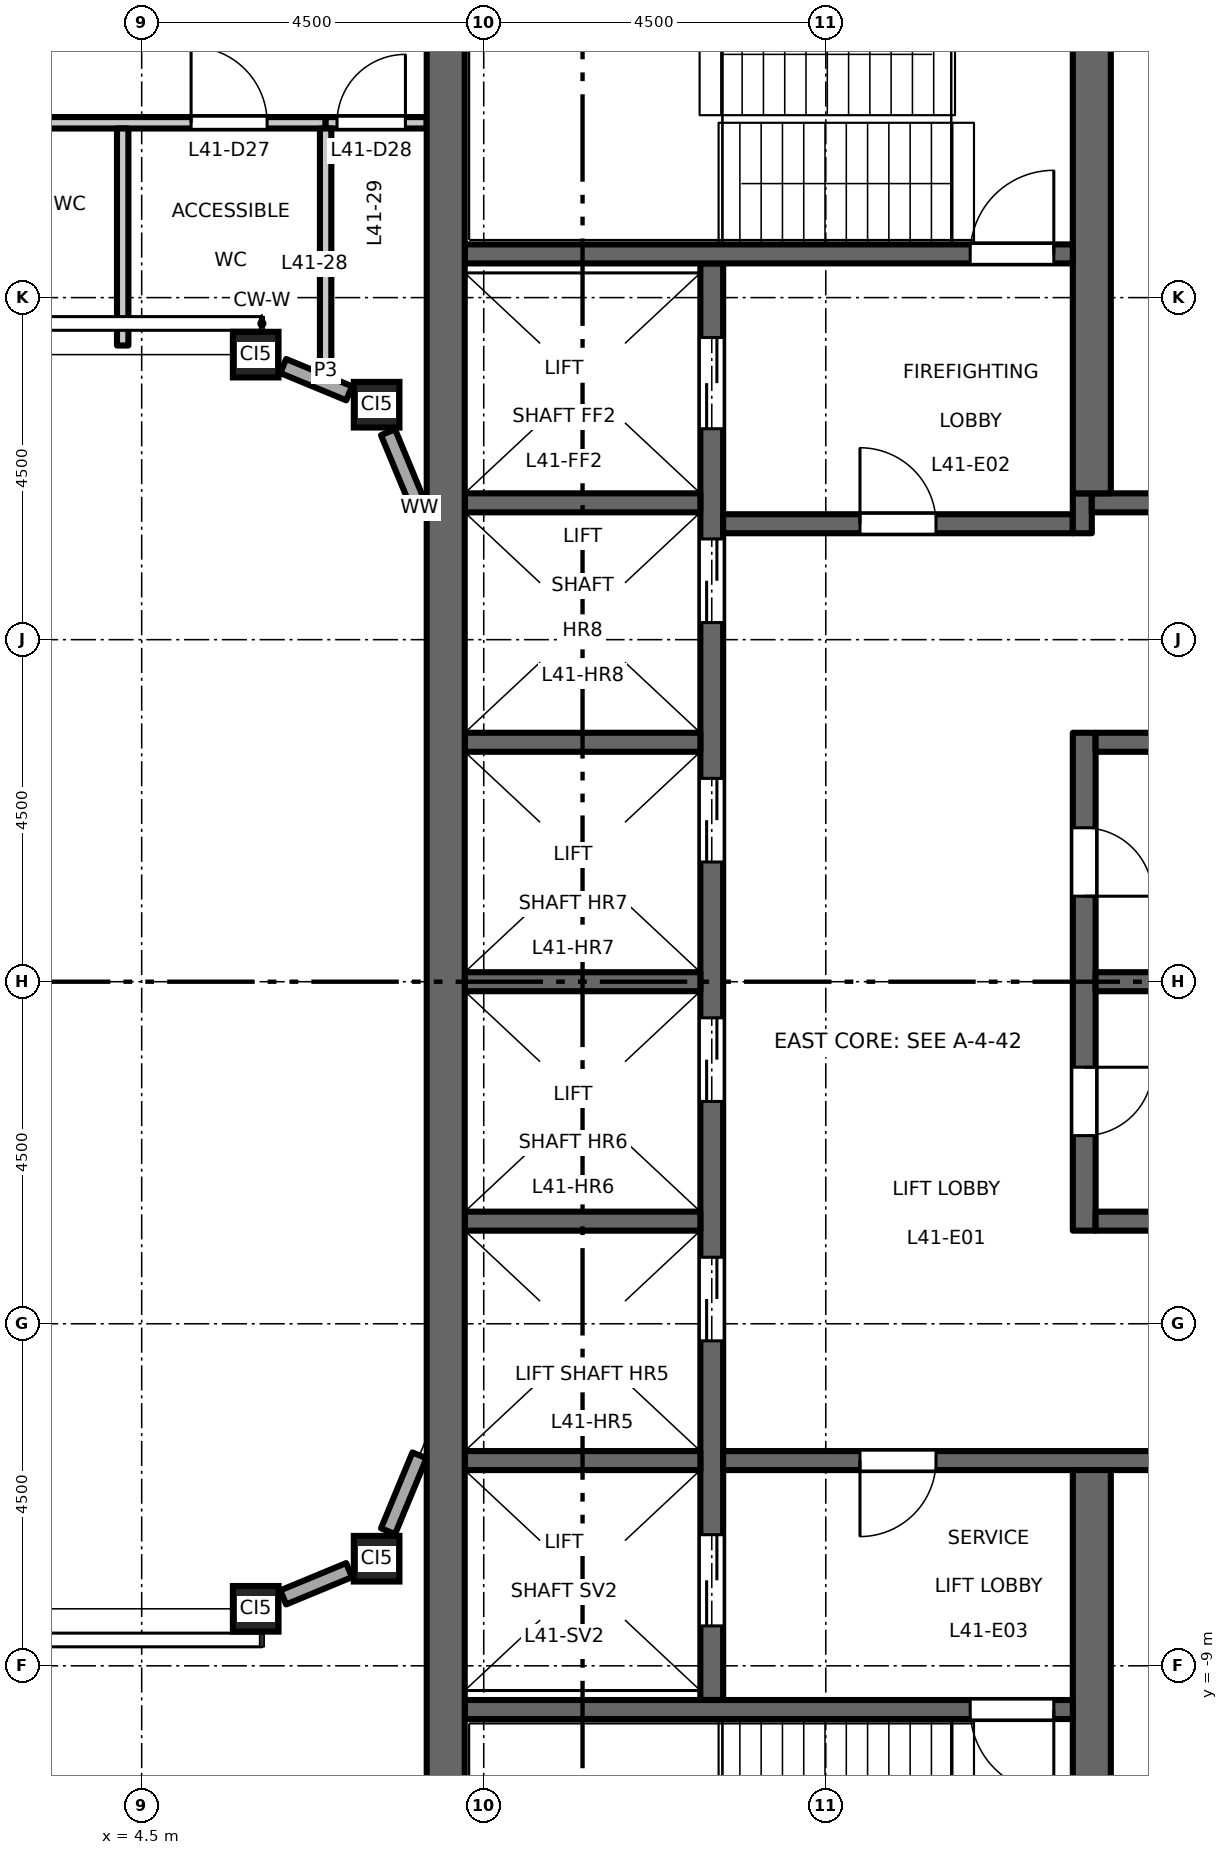
"""IFC4 building model, lengths in metres.
Left out: names, types, materials, properties, quantities, classifications, styles, units other than length and angle.
Written with IfcOpenShell. Run it as: python <this file> out.ifc"""

import sys

from ifc_helpers import new_model, si_unit, direction, frame, frame_2d, origin, origin_2d, place, context, subcontext, project, spatial, rectangle, hollow_rectangle, extrude, element, fill, save


model = new_model("IFC4")
c1 = context("Model", 3, precision=1e-05, world=origin(), true_north=direction((0.0, 1.0)))
c2 = subcontext(c1, "Body", "Model", "MODEL_VIEW")
j1 = project(units=[si_unit("LENGTHUNIT", "METRE"), si_unit("PLANEANGLEUNIT", "RADIAN")], contexts=[c1])
p1 = place(None, origin())
s1 = spatial("IfcSite", under=j1, at=p1, CompositionType="ELEMENT")
p2 = place(p1, origin())
s2 = spatial("IfcBuilding", under=s1, at=p2, CompositionType="ELEMENT")
p3 = place(p2, frame((0.0, 0.0, 192.7)))
s3 = spatial("IfcBuildingStorey", under=s2, at=p3, CompositionType="ELEMENT", Elevation=192.7)
for number, where, z_axis, x_axis in (
    (1, (6.0, -8.25, 0.0), (0.0, 0.0, 1.0), (1.0, 0.0, 0.0)),
    (2, (7.591, -7.591, 0.0), (0.0, 0.0, 1.0), (1.0, 0.0, 0.0)),
    (3, (6.0, 8.25, 0.0), (0.0, 0.0, 1.0), (1.0, 0.0, 0.0)),
    (4, (7.591, 7.591, 0.0), (0.0, 0.0, 1.0), (1.0, 0.0, 0.0)),
):
    element("IfcColumn", number, at=place(p3, frame(where, z_axis=z_axis, x_axis=x_axis)), inside=s3, PredefinedType="COLUMN", context=c2, shape_type="SweptSolid", body=[
        extrude(hollow_rectangle(XDim=0.6, YDim=0.6, WallThickness=0.032, at=origin_2d()), origin(), (0.0, 0.0, 1.0), 4.5),
    ])
p4 = place(p3, frame((12.0, -9.45, 0.0), z_axis=(0.0, 0.0, 1.0), x_axis=(0.0, 1.0, 0.0)))
e5 = element("IfcWall", 5, at=p4, inside=s3, PredefinedType="SHEAR", context=c2, shape_type="SweptSolid", body=[
    extrude(rectangle(XDim=18.9, YDim=0.3, at=frame_2d((9.45, 0.0))), origin(), (0.0, 0.0, 1.0), 4.35),
])
p5 = place(p4, frame((4.725, 0.0, 0.0)))
e6 = element("IfcOpeningElement", 6, at=p5, cuts=e5, PredefinedType="OPENING", context=c2, shape_type="SweptSolid", body=[
    extrude(rectangle(XDim=1.1, YDim=2.1, at=frame_2d((0.55, 1.05))), frame((0.0, 0.16, 0.0), z_axis=(0.0, -1.0, 0.0), x_axis=(1.0, 0.0, 0.0)), (0.0, 0.0, 1.0), 0.32),
])
p6 = place(p4, frame((7.875, 0.0, 0.0)))
e7 = element("IfcOpeningElement", 7, at=p6, cuts=e5, PredefinedType="OPENING", context=c2, shape_type="SweptSolid", body=[
    extrude(rectangle(XDim=1.1, YDim=2.1, at=frame_2d((0.55, 1.05))), frame((0.0, 0.16, 0.0), z_axis=(0.0, -1.0, 0.0), x_axis=(1.0, 0.0, 0.0)), (0.0, 0.0, 1.0), 0.32),
])
p7 = place(p4, frame((11.025, 0.0, 0.0)))
e8 = element("IfcOpeningElement", 8, at=p7, cuts=e5, PredefinedType="OPENING", context=c2, shape_type="SweptSolid", body=[
    extrude(rectangle(XDim=1.1, YDim=2.1, at=frame_2d((0.55, 1.05))), frame((0.0, 0.16, 0.0), z_axis=(0.0, -1.0, 0.0), x_axis=(1.0, 0.0, 0.0)), (0.0, 0.0, 1.0), 0.32),
])
p8 = place(p4, frame((14.175, 0.0, 0.0)))
e9 = element("IfcOpeningElement", 9, at=p8, cuts=e5, PredefinedType="OPENING", context=c2, shape_type="SweptSolid", body=[
    extrude(rectangle(XDim=1.1, YDim=2.1, at=frame_2d((0.55, 1.05))), frame((0.0, 0.16, 0.0), z_axis=(0.0, -1.0, 0.0), x_axis=(1.0, 0.0, 0.0)), (0.0, 0.0, 1.0), 0.32),
])
p9 = place(p4, frame((16.725, 0.0, 0.0)))
e10 = element("IfcOpeningElement", 10, at=p9, cuts=e5, PredefinedType="OPENING", context=c2, shape_type="SweptSolid", body=[
    extrude(rectangle(XDim=1.2, YDim=2.1, at=frame_2d((0.6, 1.05))), frame((0.0, 0.16, 0.0), z_axis=(0.0, -1.0, 0.0), x_axis=(1.0, 0.0, 0.0)), (0.0, 0.0, 1.0), 0.32),
])
p10 = place(p4, frame((0.975, 0.0, 0.0)))
e11 = element("IfcOpeningElement", 11, at=p10, cuts=e5, PredefinedType="OPENING", context=c2, shape_type="SweptSolid", body=[
    extrude(rectangle(XDim=1.2, YDim=2.1, at=frame_2d((0.6, 1.05))), frame((0.0, 0.16, 0.0), z_axis=(0.0, -1.0, 0.0), x_axis=(1.0, 0.0, 0.0)), (0.0, 0.0, 1.0), 0.32),
])
p11 = place(p3, frame((12.15, 6.025, 0.0), z_axis=(0.0, 0.0, 1.0), x_axis=(1.0, 0.0, 0.0)))
e12 = element("IfcWall", 12, at=p11, inside=s3, PredefinedType="SHEAR", context=c2, shape_type="SweptSolid", body=[
    extrude(rectangle(XDim=4.6, YDim=0.25, at=frame_2d((2.3, 0.0))), origin(), (0.0, 0.0, 1.0), 4.35),
])
p12 = place(p11, frame((1.8, 0.0, 0.0)))
e13 = element("IfcOpeningElement", 13, at=p12, cuts=e12, PredefinedType="OPENING", context=c2, shape_type="SweptSolid", body=[
    extrude(rectangle(XDim=1.0, YDim=2.1, at=frame_2d((0.5, 1.05))), frame((0.0, 0.135, 0.0), z_axis=(0.0, -1.0, 0.0), x_axis=(1.0, 0.0, 0.0)), (0.0, 0.0, 1.0), 0.27),
])
p13 = place(p3, frame((16.875, 5.9, 0.0), z_axis=(0.0, 0.0, 1.0), x_axis=(0.0, 1.0, 0.0)))
e14 = element("IfcWall", 14, at=p13, inside=s3, PredefinedType="SHEAR", context=c2, shape_type="SweptSolid", body=[
    extrude(rectangle(XDim=0.525, YDim=0.25, at=frame_2d((0.263, 0.0))), origin(), (0.0, 0.0, 1.0), 4.35),
])
p14 = place(p3, frame((17.0, 6.3, 0.0), z_axis=(0.0, 0.0, 1.0), x_axis=(1.0, 0.0, 0.0)))
e15 = element("IfcWall", 15, at=p14, inside=s3, PredefinedType="SHEAR", context=c2, shape_type="SweptSolid", body=[
    extrude(rectangle(XDim=4.25, YDim=0.25, at=frame_2d((2.125, 0.0))), origin(), (0.0, 0.0, 1.0), 4.35),
])
p15 = place(p3, frame((12.15, -6.3, 0.0), z_axis=(0.0, 0.0, 1.0), x_axis=(1.0, 0.0, 0.0)))
e16 = element("IfcWall", 16, at=p15, inside=s3, PredefinedType="SHEAR", context=c2, shape_type="SweptSolid", body=[
    extrude(rectangle(XDim=9.1, YDim=0.25, at=frame_2d((4.55, 0.0))), origin(), (0.0, 0.0, 1.0), 4.35),
])
p16 = place(p15, frame((1.8, 0.0, 0.0)))
e17 = element("IfcOpeningElement", 17, at=p16, cuts=e16, PredefinedType="OPENING", context=c2, shape_type="SweptSolid", body=[
    extrude(rectangle(XDim=1.0, YDim=2.1, at=frame_2d((0.5, 1.05))), frame((0.0, 0.135, 0.0), z_axis=(0.0, -1.0, 0.0), x_axis=(1.0, 0.0, 0.0)), (0.0, 0.0, 1.0), 0.27),
])
p17 = place(p3, frame((16.9, -3.275, 0.0), z_axis=(0.0, 0.0, 1.0), x_axis=(0.0, 1.0, 0.0)))
e18 = element("IfcWall", 18, at=p17, inside=s3, PredefinedType="SHEAR", context=c2, shape_type="SweptSolid", body=[
    extrude(rectangle(XDim=6.55, YDim=0.3, at=frame_2d((3.275, 0.0))), origin(), (0.0, 0.0, 1.0), 4.35),
])
p18 = place(p17, frame((1.25, 0.0, 0.0)))
e19 = element("IfcOpeningElement", 19, at=p18, cuts=e18, PredefinedType="OPENING", context=c2, shape_type="SweptSolid", body=[
    extrude(rectangle(XDim=0.9, YDim=2.1, at=frame_2d((0.45, 1.05))), frame((0.0, 0.16, 0.0), z_axis=(0.0, -1.0, 0.0), x_axis=(1.0, 0.0, 0.0)), (0.0, 0.0, 1.0), 0.32),
])
p19 = place(p17, frame((4.4, 0.0, 0.0)))
e20 = element("IfcOpeningElement", 20, at=p19, cuts=e18, PredefinedType="OPENING", context=c2, shape_type="SweptSolid", body=[
    extrude(rectangle(XDim=0.9, YDim=2.1, at=frame_2d((0.45, 1.05))), frame((0.0, 0.16, 0.0), z_axis=(0.0, -1.0, 0.0), x_axis=(1.0, 0.0, 0.0)), (0.0, 0.0, 1.0), 0.32),
])
for number, where, z_axis, x_axis in (
    (21, (17.05, 0.0, 0.0), (0.0, 0.0, 1.0), (1.0, 0.0, 0.0)),
    (22, (17.05, 3.15, 0.0), (0.0, 0.0, 1.0), (1.0, 0.0, 0.0)),
    (23, (17.05, -3.15, 0.0), (0.0, 0.0, 1.0), (1.0, 0.0, 0.0)),
):
    element("IfcWall", number, at=place(p3, frame(where, z_axis=z_axis, x_axis=x_axis)), inside=s3, PredefinedType="SHEAR", context=c2, shape_type="SweptSolid", body=[
        extrude(rectangle(XDim=4.2, YDim=0.25, at=frame_2d((2.1, 0.0))), origin(), (0.0, 0.0, 1.0), 4.35),
    ])
for number, where, z_axis, x_axis in (
    (24, (17.0, 6.425, 0.0), (0.0, 0.0, 1.0), (0.0, 1.0, 0.0)),
    (25, (17.0, -13.0, 0.0), (0.0, 0.0, 1.0), (0.0, 1.0, 0.0)),
):
    element("IfcWall", number, at=place(p3, frame(where, z_axis=z_axis, x_axis=x_axis)), inside=s3, PredefinedType="SHEAR", context=c2, shape_type="SweptSolid", body=[
        extrude(rectangle(XDim=6.575, YDim=0.5, at=frame_2d((3.288, 0.0))), origin(), (0.0, 0.0, 1.0), 4.35),
    ])
for number, where, z_axis, x_axis in (
    (26, (8.75, 0.0, 0.0), (0.0, 0.0, 1.0), (1.0, 0.0, 0.0)),
    (27, (8.75, 3.15, 0.0), (0.0, 0.0, 1.0), (1.0, 0.0, 0.0)),
    (28, (8.75, 6.3, 0.0), (0.0, 0.0, 1.0), (1.0, 0.0, 0.0)),
    (29, (8.75, -3.15, 0.0), (0.0, 0.0, 1.0), (1.0, 0.0, 0.0)),
    (30, (8.75, -6.3, 0.0), (0.0, 0.0, 1.0), (1.0, 0.0, 0.0)),
):
    element("IfcWall", number, at=place(p3, frame(where, z_axis=z_axis, x_axis=x_axis)), inside=s3, PredefinedType="SHEAR", context=c2, shape_type="SweptSolid", body=[
        extrude(rectangle(XDim=3.1, YDim=0.25, at=frame_2d((1.55, 0.0))), origin(), (0.0, 0.0, 1.0), 4.35),
    ])
p20 = place(p3, frame((8.75, 9.575, 0.0), z_axis=(0.0, 0.0, 1.0), x_axis=(1.0, 0.0, 0.0)))
e31 = element("IfcWall", 31, at=p20, inside=s3, PredefinedType="SHEAR", context=c2, shape_type="SweptSolid", body=[
    extrude(rectangle(XDim=8.0, YDim=0.25, at=frame_2d((4.0, 0.0))), origin(), (0.0, 0.0, 1.0), 4.35),
])
p21 = place(p20, frame((6.65, 0.0, 0.0)))
e32 = element("IfcOpeningElement", 32, at=p21, cuts=e31, PredefinedType="OPENING", context=c2, shape_type="SweptSolid", body=[
    extrude(rectangle(XDim=1.1, YDim=2.1, at=frame_2d((0.55, 1.05))), frame((0.0, 0.135, 0.0), z_axis=(0.0, -1.0, 0.0), x_axis=(1.0, 0.0, 0.0)), (0.0, 0.0, 1.0), 0.27),
])
p22 = place(p3, frame((8.75, -9.575, 0.0), z_axis=(0.0, 0.0, 1.0), x_axis=(1.0, 0.0, 0.0)))
e33 = element("IfcWall", 33, at=p22, inside=s3, PredefinedType="SHEAR", context=c2, shape_type="SweptSolid", body=[
    extrude(rectangle(XDim=8.0, YDim=0.25, at=frame_2d((4.0, 0.0))), origin(), (0.0, 0.0, 1.0), 4.35),
])
p23 = place(p22, frame((6.65, 0.0, 0.0)))
e34 = element("IfcOpeningElement", 34, at=p23, cuts=e33, PredefinedType="OPENING", context=c2, shape_type="SweptSolid", body=[
    extrude(rectangle(XDim=1.1, YDim=2.1, at=frame_2d((0.55, 1.05))), frame((0.0, 0.135, 0.0), z_axis=(0.0, -1.0, 0.0), x_axis=(1.0, 0.0, 0.0)), (0.0, 0.0, 1.0), 0.27),
])
p24 = place(p3, frame((8.5, -13.0, 0.0), z_axis=(0.0, 0.0, 1.0), x_axis=(0.0, 1.0, 0.0)))
e35 = element("IfcWall", 35, at=p24, inside=s3, PredefinedType="SHEAR", context=c2, shape_type="SweptSolid", body=[
    extrude(rectangle(XDim=26.0, YDim=0.5, at=frame_2d((13.0, 0.0))), origin(), (0.0, 0.0, 1.0), 4.35),
])
p25 = place(p3, frame((6.362, -8.1, 0.0), z_axis=(0.0, 0.0, 1.0), x_axis=(0.923829670615, 0.382803787458, 0.0)))
e36 = element("IfcWall", 36, at=p25, inside=s3, PredefinedType="STANDARD", context=c2, shape_type="SweptSolid", body=[
    extrude(rectangle(XDim=0.938, YDim=0.2, at=frame_2d((0.469, 0.0))), origin(), (0.0, 0.0, 1.0), 3.918),
])
for number, where, z_axis, x_axis in (
    (37, (7.741, -7.229, 0.0), (0.0, 0.0, 1.0), (0.383, 0.924, 0.0)),
    (38, (8.154, 6.231, 0.0), (0.0, 0.0, 1.0), (-0.383, 0.924, 0.0)),
):
    element("IfcWall", number, at=place(p3, frame(where, z_axis=z_axis, x_axis=x_axis)), inside=s3, PredefinedType="STANDARD", context=c2, shape_type="SweptSolid", body=[
        extrude(rectangle(XDim=1.08, YDim=0.2, at=frame_2d((0.54, 0.0))), origin(), (0.0, 0.0, 1.0), 3.918),
    ])
p26 = place(p3, frame((7.229, 7.741, 0.0), z_axis=(0.0, 0.0, 1.0), x_axis=(-0.923829670615, 0.382803787458, 0.0)))
e39 = element("IfcWall", 39, at=p26, inside=s3, PredefinedType="STANDARD", context=c2, shape_type="SweptSolid", body=[
    extrude(rectangle(XDim=0.938, YDim=0.2, at=frame_2d((0.469, 0.0))), origin(), (0.0, 0.0, 1.0), 3.918),
])
p27 = place(p3, frame((-8.25, 11.3, 0.0), z_axis=(0.0, 0.0, 1.0), x_axis=(1.0, 0.0, 0.0)))
e40 = element("IfcWall", 40, at=p27, inside=s3, PredefinedType="PARTITIONING", context=c2, shape_type="SweptSolid", body=[
    extrude(rectangle(XDim=15.17, YDim=0.15, at=frame_2d((7.585, 0.0))), origin(), (0.0, 0.0, 1.0), 4.35),
])
p28 = place(p27, frame((2.65, 0.0, 0.0)))
e41 = element("IfcOpeningElement", 41, at=p28, cuts=e40, PredefinedType="OPENING", context=c2, shape_type="SweptSolid", body=[
    extrude(rectangle(XDim=1.0, YDim=2.1, at=frame_2d((0.5, 1.05))), frame((0.0, 0.085, 0.0), z_axis=(0.0, -1.0, 0.0), x_axis=(1.0, 0.0, 0.0)), (0.0, 0.0, 1.0), 0.17),
])
p29 = place(p27, frame((8.9, 0.0, 0.0)))
e42 = element("IfcOpeningElement", 42, at=p29, cuts=e40, PredefinedType="OPENING", context=c2, shape_type="SweptSolid", body=[
    extrude(rectangle(XDim=1.0, YDim=2.1, at=frame_2d((0.5, 1.05))), frame((0.0, 0.085, 0.0), z_axis=(0.0, -1.0, 0.0), x_axis=(1.0, 0.0, 0.0)), (0.0, 0.0, 1.0), 0.17),
])
p30 = place(p27, frame((13.4, 0.0, 0.0)))
e43 = element("IfcOpeningElement", 43, at=p30, cuts=e40, PredefinedType="OPENING", context=c2, shape_type="SweptSolid", body=[
    extrude(rectangle(XDim=1.0, YDim=2.1, at=frame_2d((0.5, 1.05))), frame((0.0, 0.085, 0.0), z_axis=(0.0, -1.0, 0.0), x_axis=(1.0, 0.0, 0.0)), (0.0, 0.0, 1.0), 0.17),
])
p31 = place(p3, frame((6.92, 11.3, 0.0), z_axis=(0.0, 0.0, 1.0), x_axis=(1.0, 0.0, 0.0)))
e44 = element("IfcWall", 44, at=p31, inside=s3, PredefinedType="PARTITIONING", context=c2, shape_type="SweptSolid", body=[
    extrude(rectangle(XDim=1.33, YDim=0.15, at=frame_2d((0.665, 0.0))), origin(), (0.0, 0.0, 1.0), 4.35),
])
p32 = place(p31, frame((0.15, 0.0, 0.0)))
e45 = element("IfcOpeningElement", 45, at=p32, cuts=e44, PredefinedType="OPENING", context=c2, shape_type="SweptSolid", body=[
    extrude(rectangle(XDim=0.9, YDim=2.1, at=frame_2d((0.45, 1.05))), frame((0.0, 0.085, 0.0), z_axis=(0.0, -1.0, 0.0), x_axis=(1.0, 0.0, 0.0)), (0.0, 0.0, 1.0), 0.17),
])
p33 = place(p3, frame((4.25, 8.37, 0.0), z_axis=(0.0, 0.0, 1.0), x_axis=(0.0, 1.0, 0.0)))
e46 = element("IfcWall", 46, at=p33, inside=s3, PredefinedType="PARTITIONING", context=c2, shape_type="SweptSolid", body=[
    extrude(rectangle(XDim=2.855, YDim=0.15, at=frame_2d((1.427, 0.0))), origin(), (0.0, 0.0, 1.0), 4.35),
])
p34 = place(p3, frame((6.92, 8.029, 0.0), z_axis=(0.0, 0.0, 1.0), x_axis=(0.0, 1.0, 0.0)))
e47 = element("IfcWall", 47, at=p34, inside=s3, PredefinedType="PARTITIONING", context=c2, shape_type="SweptSolid", body=[
    extrude(rectangle(XDim=3.196, YDim=0.15, at=frame_2d((1.598, 0.0))), origin(), (0.0, 0.0, 1.0), 4.35),
])
p35 = place(p12, origin())
e48 = element("IfcDoor", 48, at=p35, inside=s3, OperationType="SINGLE_SWING_RIGHT", PredefinedType="DOOR", context=c2, shape_type="SweptSolid", body=[
    extrude(rectangle(XDim=1.0, YDim=2.1, at=frame_2d((0.5, 1.05))), frame((0.0, 0.025, 0.0), z_axis=(0.0, -1.0, 0.0), x_axis=(1.0, 0.0, 0.0)), (0.0, 0.0, 1.0), 0.05),
])
fill(e13, e48)
p36 = place(p16, origin())
e49 = element("IfcDoor", 49, at=p36, inside=s3, OperationType="SINGLE_SWING_LEFT", PredefinedType="DOOR", context=c2, shape_type="SweptSolid", body=[
    extrude(rectangle(XDim=1.0, YDim=2.1, at=frame_2d((0.5, 1.05))), frame((0.0, 0.025, 0.0), z_axis=(0.0, -1.0, 0.0), x_axis=(1.0, 0.0, 0.0)), (0.0, 0.0, 1.0), 0.05),
])
fill(e17, e49)
p37 = place(p21, origin())
e50 = element("IfcDoor", 50, at=p37, inside=s3, OperationType="SINGLE_SWING_LEFT", PredefinedType="DOOR", context=c2, shape_type="SweptSolid", body=[
    extrude(rectangle(XDim=1.1, YDim=2.1, at=frame_2d((0.55, 1.05))), frame((0.0, 0.025, 0.0), z_axis=(0.0, -1.0, 0.0), x_axis=(1.0, 0.0, 0.0)), (0.0, 0.0, 1.0), 0.05),
])
fill(e32, e50)
p38 = place(p23, origin())
e51 = element("IfcDoor", 51, at=p38, inside=s3, OperationType="SINGLE_SWING_RIGHT", PredefinedType="DOOR", context=c2, shape_type="SweptSolid", body=[
    extrude(rectangle(XDim=1.1, YDim=2.1, at=frame_2d((0.55, 1.05))), frame((0.0, 0.025, 0.0), z_axis=(0.0, -1.0, 0.0), x_axis=(1.0, 0.0, 0.0)), (0.0, 0.0, 1.0), 0.05),
])
fill(e34, e51)
p39 = place(p5, origin())
e52 = element("IfcDoor", 52, at=p39, inside=s3, OperationType="DOUBLE_DOOR_SLIDING", PredefinedType="DOOR", context=c2, shape_type="SweptSolid", body=[
    extrude(rectangle(XDim=1.1, YDim=2.1, at=frame_2d((0.55, 1.05))), frame((0.0, 0.025, 0.0), z_axis=(0.0, -1.0, 0.0), x_axis=(1.0, 0.0, 0.0)), (0.0, 0.0, 1.0), 0.05),
])
fill(e6, e52)
p40 = place(p6, origin())
e53 = element("IfcDoor", 53, at=p40, inside=s3, OperationType="DOUBLE_DOOR_SLIDING", PredefinedType="DOOR", context=c2, shape_type="SweptSolid", body=[
    extrude(rectangle(XDim=1.1, YDim=2.1, at=frame_2d((0.55, 1.05))), frame((0.0, 0.025, 0.0), z_axis=(0.0, -1.0, 0.0), x_axis=(1.0, 0.0, 0.0)), (0.0, 0.0, 1.0), 0.05),
])
fill(e7, e53)
p41 = place(p7, origin())
e54 = element("IfcDoor", 54, at=p41, inside=s3, OperationType="DOUBLE_DOOR_SLIDING", PredefinedType="DOOR", context=c2, shape_type="SweptSolid", body=[
    extrude(rectangle(XDim=1.1, YDim=2.1, at=frame_2d((0.55, 1.05))), frame((0.0, 0.025, 0.0), z_axis=(0.0, -1.0, 0.0), x_axis=(1.0, 0.0, 0.0)), (0.0, 0.0, 1.0), 0.05),
])
fill(e8, e54)
p42 = place(p8, origin())
e55 = element("IfcDoor", 55, at=p42, inside=s3, OperationType="DOUBLE_DOOR_SLIDING", PredefinedType="DOOR", context=c2, shape_type="SweptSolid", body=[
    extrude(rectangle(XDim=1.1, YDim=2.1, at=frame_2d((0.55, 1.05))), frame((0.0, 0.025, 0.0), z_axis=(0.0, -1.0, 0.0), x_axis=(1.0, 0.0, 0.0)), (0.0, 0.0, 1.0), 0.05),
])
fill(e9, e55)
p43 = place(p9, origin())
e56 = element("IfcDoor", 56, at=p43, inside=s3, OperationType="DOUBLE_DOOR_SLIDING", PredefinedType="DOOR", context=c2, shape_type="SweptSolid", body=[
    extrude(rectangle(XDim=1.2, YDim=2.1, at=frame_2d((0.6, 1.05))), frame((0.0, 0.025, 0.0), z_axis=(0.0, -1.0, 0.0), x_axis=(1.0, 0.0, 0.0)), (0.0, 0.0, 1.0), 0.05),
])
fill(e10, e56)
p44 = place(p10, origin())
e57 = element("IfcDoor", 57, at=p44, inside=s3, OperationType="DOUBLE_DOOR_SLIDING", PredefinedType="DOOR", context=c2, shape_type="SweptSolid", body=[
    extrude(rectangle(XDim=1.2, YDim=2.1, at=frame_2d((0.6, 1.05))), frame((0.0, 0.025, 0.0), z_axis=(0.0, -1.0, 0.0), x_axis=(1.0, 0.0, 0.0)), (0.0, 0.0, 1.0), 0.05),
])
fill(e11, e57)
p45 = place(p18, origin())
e58 = element("IfcDoor", 58, at=p45, inside=s3, OperationType="SINGLE_SWING_RIGHT", PredefinedType="DOOR", context=c2, shape_type="SweptSolid", body=[
    extrude(rectangle(XDim=0.9, YDim=2.1, at=frame_2d((0.45, 1.05))), frame((0.0, 0.025, 0.0), z_axis=(0.0, -1.0, 0.0), x_axis=(1.0, 0.0, 0.0)), (0.0, 0.0, 1.0), 0.05),
])
fill(e19, e58)
p46 = place(p19, origin())
e59 = element("IfcDoor", 59, at=p46, inside=s3, OperationType="SINGLE_SWING_LEFT", PredefinedType="DOOR", context=c2, shape_type="SweptSolid", body=[
    extrude(rectangle(XDim=0.9, YDim=2.1, at=frame_2d((0.45, 1.05))), frame((0.0, 0.025, 0.0), z_axis=(0.0, -1.0, 0.0), x_axis=(1.0, 0.0, 0.0)), (0.0, 0.0, 1.0), 0.05),
])
fill(e20, e59)
p47 = place(p30, origin())
e60 = element("IfcDoor", 60, at=p47, inside=s3, OperationType="SINGLE_SWING_LEFT", PredefinedType="DOOR", context=c2, shape_type="SweptSolid", body=[
    extrude(rectangle(XDim=1.0, YDim=2.1, at=frame_2d((0.5, 1.05))), frame((0.0, 0.025, 0.0), z_axis=(0.0, -1.0, 0.0), x_axis=(1.0, 0.0, 0.0)), (0.0, 0.0, 1.0), 0.05),
])
fill(e43, e60)
p48 = place(p32, origin())
e61 = element("IfcDoor", 61, at=p48, inside=s3, OperationType="SINGLE_SWING_RIGHT", PredefinedType="DOOR", context=c2, shape_type="SweptSolid", body=[
    extrude(rectangle(XDim=0.9, YDim=2.1, at=frame_2d((0.45, 1.05))), frame((0.0, 0.025, 0.0), z_axis=(0.0, -1.0, 0.0), x_axis=(1.0, 0.0, 0.0)), (0.0, 0.0, 1.0), 0.05),
])
fill(e45, e61)
save(model, sys.argv[1])
